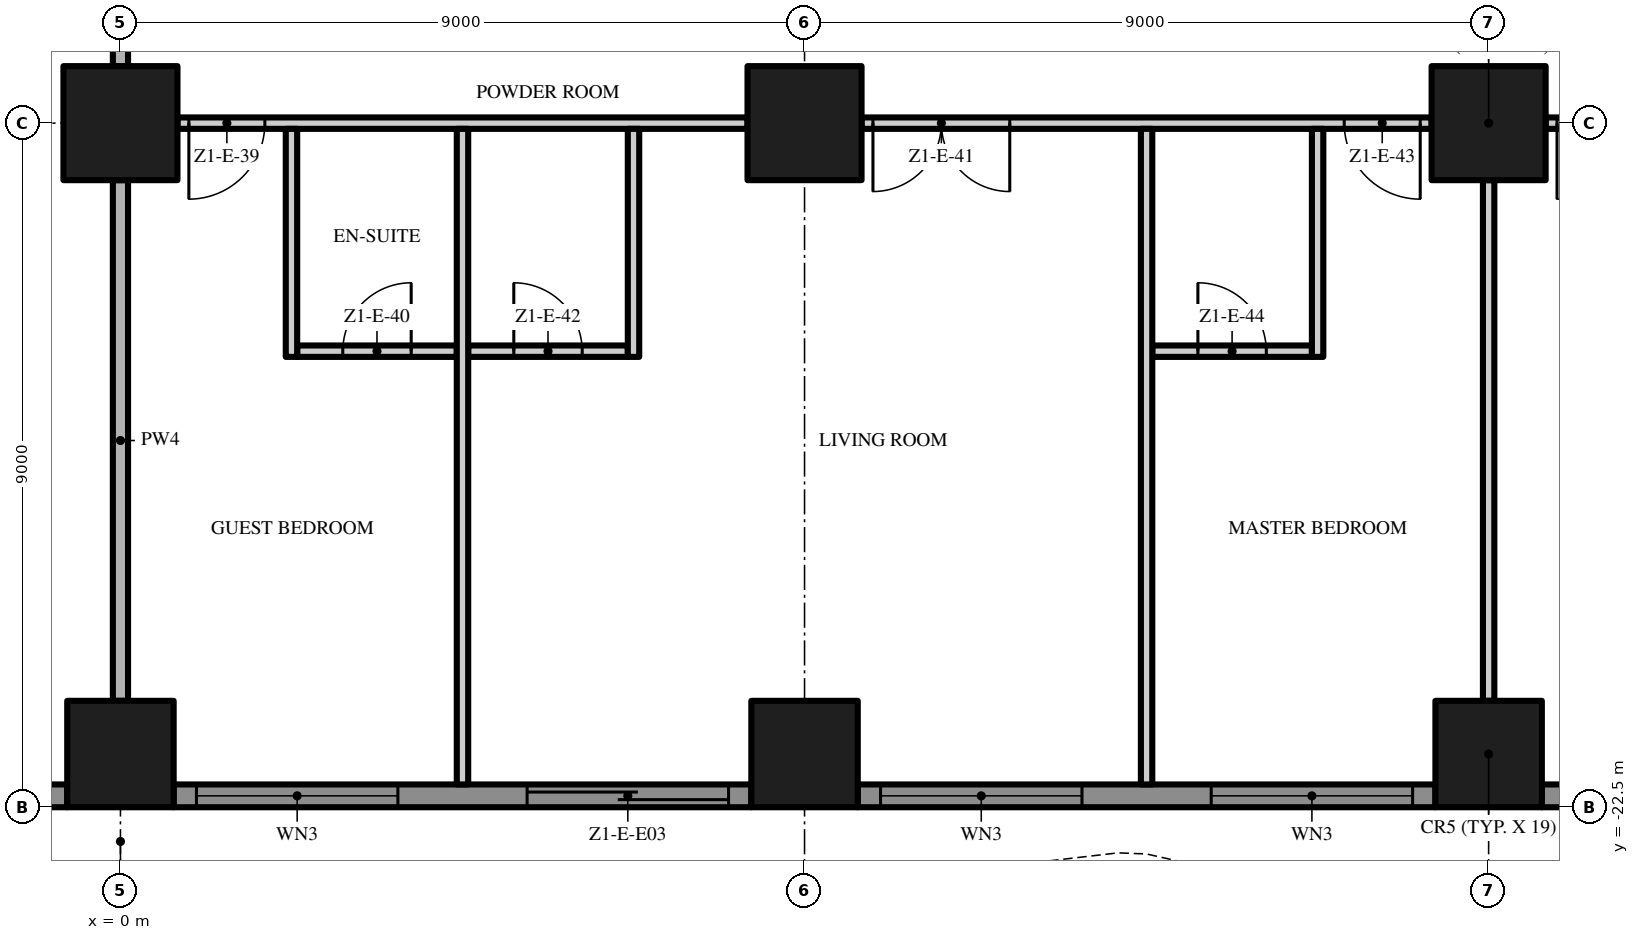
"""IFC4 building model, lengths in metres.
Left out: names, types, materials, properties, quantities, classifications, styles, units other than length and angle.
Written with IfcOpenShell. Run it as: python <this file> out.ifc"""

import sys

from ifc_helpers import new_model, si_unit, direction, frame, frame_2d, origin, origin_2d, place, context, subcontext, project, spatial, polyline, rectangle, outline, extrude, element, fill, save


model = new_model("IFC4")
c1 = context("Model", 3, precision=1e-05, world=origin(), true_north=direction((0.0, 1.0)))
c2 = subcontext(c1, "Body", "Model", "MODEL_VIEW")
j1 = project(units=[si_unit("LENGTHUNIT", "METRE"), si_unit("PLANEANGLEUNIT", "RADIAN")], contexts=[c1])
p1 = place(None, origin())
s1 = spatial("IfcSite", under=j1, at=p1, CompositionType="ELEMENT")
p2 = place(p1, origin())
s2 = spatial("IfcBuilding", under=s1, at=p2, CompositionType="ELEMENT")
p3 = place(p2, frame((0.0, 0.0, 56.8)))
s3 = spatial("IfcBuildingStorey", under=s2, at=p3, CompositionType="ELEMENT", Elevation=56.8)
p4 = place(p3, frame((0.0, -13.5, 0.0), z_axis=(0.0, 0.0, 1.0), x_axis=(1.0, 0.0, 0.0)))
e1 = element("IfcColumn", 1, at=p4, inside=s3, PredefinedType="COLUMN", context=c2, shape_type="SweptSolid", body=[
    extrude(rectangle(XDim=1.5, YDim=1.5, at=origin_2d()), origin(), (0.0, 0.0, 1.0), 3.5),
])
p5 = place(p3, frame((0.0, -21.8, 0.0), z_axis=(0.0, 0.0, 1.0), x_axis=(1.0, 0.0, 0.0)))
e2 = element("IfcColumn", 2, at=p5, inside=s3, PredefinedType="COLUMN", context=c2, shape_type="SweptSolid", body=[
    extrude(rectangle(XDim=1.4, YDim=1.4, at=origin_2d()), origin(), (0.0, 0.0, 1.0), 3.5),
])
p6 = place(p3, frame((18.0, -13.5, 0.0), z_axis=(0.0, 0.0, 1.0), x_axis=(1.0, 0.0, 0.0)))
e3 = element("IfcColumn", 3, at=p6, inside=s3, PredefinedType="COLUMN", context=c2, shape_type="SweptSolid", body=[
    extrude(rectangle(XDim=1.5, YDim=1.5, at=origin_2d()), origin(), (0.0, 0.0, 1.0), 3.5),
])
p7 = place(p3, frame((18.0, -21.8, 0.0), z_axis=(0.0, 0.0, 1.0), x_axis=(1.0, 0.0, 0.0)))
e4 = element("IfcColumn", 4, at=p7, inside=s3, PredefinedType="COLUMN", context=c2, shape_type="SweptSolid", body=[
    extrude(rectangle(XDim=1.4, YDim=1.4, at=origin_2d()), origin(), (0.0, 0.0, 1.0), 3.5),
])
p8 = place(p3, frame((9.0, -13.5, 0.0), z_axis=(0.0, 0.0, 1.0), x_axis=(1.0, 0.0, 0.0)))
e5 = element("IfcColumn", 5, at=p8, inside=s3, PredefinedType="COLUMN", context=c2, shape_type="SweptSolid", body=[
    extrude(rectangle(XDim=1.5, YDim=1.5, at=origin_2d()), origin(), (0.0, 0.0, 1.0), 3.5),
])
p9 = place(p3, frame((9.0, -21.8, 0.0), z_axis=(0.0, 0.0, 1.0), x_axis=(1.0, 0.0, 0.0)))
e6 = element("IfcColumn", 6, at=p9, inside=s3, PredefinedType="COLUMN", context=c2, shape_type="SweptSolid", body=[
    extrude(rectangle(XDim=1.4, YDim=1.4, at=origin_2d()), origin(), (0.0, 0.0, 1.0), 3.5),
])
p10 = place(p3, frame((-0.7, -22.35, 0.0), z_axis=(0.0, 0.0, 1.0), x_axis=(-1.0, 0.0, 0.0)))
e7 = element("IfcWall", 7, at=p10, inside=s3, PredefinedType="SOLIDWALL", context=c2, shape_type="SweptSolid", body=[
    extrude(rectangle(XDim=7.6, YDim=0.3, at=frame_2d((3.8, 0.0))), origin(), (0.0, 0.0, 1.0), 3.5),
])
p11 = place(p10, frame((4.65, 0.0, 0.0)))
e8 = element("IfcOpeningElement", 8, at=p11, cuts=e7, PredefinedType="OPENING", context=c2, shape_type="SweptSolid", body=[
    extrude(rectangle(XDim=2.65, YDim=2.4, at=frame_2d((1.325, 1.2))), frame((0.0, 0.16, 0.0), z_axis=(0.0, -1.0, 0.0), x_axis=(1.0, 0.0, 0.0)), (0.0, 0.0, 1.0), 0.32),
])
p12 = place(p10, frame((0.3, 0.0, 0.45)))
e9 = element("IfcOpeningElement", 9, at=p12, cuts=e7, PredefinedType="OPENING", context=c2, shape_type="SweptSolid", body=[
    extrude(rectangle(XDim=2.65, YDim=2.65, at=frame_2d((1.325, 1.325))), frame((0.0, 0.16, 0.0), z_axis=(0.0, -1.0, 0.0), x_axis=(1.0, 0.0, 0.0)), (0.0, 0.0, 1.0), 0.32),
])
p13 = place(p3, frame((8.3, -22.35, 0.0), z_axis=(0.0, 0.0, 1.0), x_axis=(-1.0, 0.0, 0.0)))
e10 = element("IfcWall", 10, at=p13, inside=s3, PredefinedType="SOLIDWALL", context=c2, shape_type="SweptSolid", body=[
    extrude(rectangle(XDim=7.6, YDim=0.3, at=frame_2d((3.8, 0.0))), origin(), (0.0, 0.0, 1.0), 3.5),
])
p14 = place(p13, frame((4.65, 0.0, 0.45)))
e11 = element("IfcOpeningElement", 11, at=p14, cuts=e10, PredefinedType="OPENING", context=c2, shape_type="SweptSolid", body=[
    extrude(rectangle(XDim=2.65, YDim=2.65, at=frame_2d((1.325, 1.325))), frame((0.0, 0.16, 0.0), z_axis=(0.0, -1.0, 0.0), x_axis=(1.0, 0.0, 0.0)), (0.0, 0.0, 1.0), 0.32),
])
p15 = place(p13, frame((0.3, 0.0, 0.0)))
e12 = element("IfcOpeningElement", 12, at=p15, cuts=e10, PredefinedType="OPENING", context=c2, shape_type="SweptSolid", body=[
    extrude(rectangle(XDim=2.65, YDim=2.4, at=frame_2d((1.325, 1.2))), frame((0.0, 0.16, 0.0), z_axis=(0.0, -1.0, 0.0), x_axis=(1.0, 0.0, 0.0)), (0.0, 0.0, 1.0), 0.32),
])
p16 = place(p3, frame((17.3, -22.35, 0.0), z_axis=(0.0, 0.0, 1.0), x_axis=(-1.0, 0.0, 0.0)))
e13 = element("IfcWall", 13, at=p16, inside=s3, PredefinedType="SOLIDWALL", context=c2, shape_type="SweptSolid", body=[
    extrude(rectangle(XDim=7.6, YDim=0.3, at=frame_2d((3.8, 0.0))), origin(), (0.0, 0.0, 1.0), 3.5),
])
p17 = place(p16, frame((4.65, 0.0, 0.45)))
e14 = element("IfcOpeningElement", 14, at=p17, cuts=e13, PredefinedType="OPENING", context=c2, shape_type="SweptSolid", body=[
    extrude(rectangle(XDim=2.65, YDim=2.65, at=frame_2d((1.325, 1.325))), frame((0.0, 0.16, 0.0), z_axis=(0.0, -1.0, 0.0), x_axis=(1.0, 0.0, 0.0)), (0.0, 0.0, 1.0), 0.32),
])
p18 = place(p16, frame((0.3, 0.0, 0.45)))
e15 = element("IfcOpeningElement", 15, at=p18, cuts=e13, PredefinedType="OPENING", context=c2, shape_type="SweptSolid", body=[
    extrude(rectangle(XDim=2.65, YDim=2.65, at=frame_2d((1.325, 1.325))), frame((0.0, 0.16, 0.0), z_axis=(0.0, -1.0, 0.0), x_axis=(1.0, 0.0, 0.0)), (0.0, 0.0, 1.0), 0.32),
])
p19 = place(p3, frame((22.5, -22.35, 0.0), z_axis=(0.0, 0.0, 1.0), x_axis=(-1.0, 0.0, 0.0)))
e16 = element("IfcWall", 16, at=p19, inside=s3, PredefinedType="SOLIDWALL", context=c2, shape_type="SweptSolid", body=[
    extrude(rectangle(XDim=3.8, YDim=0.3, at=frame_2d((1.9, 0.0))), origin(), (0.0, 0.0, 1.0), 3.5),
])
p20 = place(p19, frame((0.85, 0.0, 0.0)))
e17 = element("IfcOpeningElement", 17, at=p20, cuts=e16, PredefinedType="OPENING", context=c2, shape_type="SweptSolid", body=[
    extrude(rectangle(XDim=2.65, YDim=2.4, at=frame_2d((1.325, 1.2))), frame((0.0, 0.16, 0.0), z_axis=(0.0, -1.0, 0.0), x_axis=(1.0, 0.0, 0.0)), (0.0, 0.0, 1.0), 0.32),
])
p21 = place(p3, origin())
e18 = element("IfcWall", 18, at=p21, inside=s3, PredefinedType="USERDEFINED", context=c2, shape_type="SweptSolid", body=[
    extrude(outline(polyline([(-22.5, -25.149), (-21.0, -24.488), (-19.5, -23.755), (-18.0, -23.231), (-16.875, -23.1), (-16.5, -23.115), (-15.0, -23.451), (-13.5, -24.112), (-12.0, -24.845), (-10.5, -25.369), (-9.375, -25.5), (-9.0, -25.485), (-7.5, -25.149), (-6.0, -24.488), (-4.5, -23.755), (-3.0, -23.231), (-1.875, -23.1), (-1.5, -23.115), (0.0, -23.451), (1.5, -24.112), (3.0, -24.845), (4.5, -25.369), (5.625, -25.5), (6.0, -25.485), (7.5, -25.149), (9.0, -24.488), (10.5, -23.755), (12.0, -23.231), (13.125, -23.1), (13.5, -23.115), (15.0, -23.451), (16.5, -24.112), (18.0, -24.845), (19.5, -25.369), (20.625, -25.5), (21.0, -25.485), (22.5, -25.149), (22.445, -24.905), (20.967, -25.236), (20.635, -25.249), (19.556, -25.124), (18.096, -24.614), (16.605, -23.885), (15.079, -23.213), (13.533, -22.866), (13.115, -22.849), (11.944, -22.986), (10.404, -23.524), (8.895, -24.261), (7.421, -24.91), (5.967, -25.236), (5.635, -25.249), (4.556, -25.124), (3.096, -24.614), (1.605, -23.885), (0.079, -23.213), (-1.467, -22.866), (-1.885, -22.849), (-3.056, -22.986), (-4.596, -23.524), (-6.105, -24.261), (-7.579, -24.91), (-9.033, -25.236), (-9.365, -25.249), (-10.444, -25.124), (-11.904, -24.614), (-13.395, -23.885), (-14.921, -23.213), (-16.467, -22.866), (-16.885, -22.849), (-18.056, -22.986), (-19.596, -23.524), (-21.105, -24.261), (-22.601, -24.92), (-22.5, -25.149)])), origin(), (0.0, 0.0, 1.0), 0.9),
])
p22 = place(p3, frame((2.325, -16.5, 0.0), z_axis=(0.0, 0.0, 1.0), x_axis=(1.0, 0.0, 0.0)))
e19 = element("IfcWall", 19, at=p22, inside=s3, PredefinedType="PARTITIONING", context=c2, shape_type="SweptSolid", body=[
    extrude(rectangle(XDim=2.1, YDim=0.15, at=frame_2d((1.05, 0.0))), origin(), (0.0, 0.0, 1.0), 3.5),
])
p23 = place(p22, frame((0.6, 0.0, 0.0)))
e20 = element("IfcOpeningElement", 20, at=p23, cuts=e19, PredefinedType="OPENING", context=c2, shape_type="SweptSolid", body=[
    extrude(rectangle(XDim=0.9, YDim=2.1, at=frame_2d((0.45, 1.05))), frame((0.0, 0.085, 0.0), z_axis=(0.0, -1.0, 0.0), x_axis=(1.0, 0.0, 0.0)), (0.0, 0.0, 1.0), 0.17),
])
p24 = place(p3, frame((4.575, -16.5, 0.0), z_axis=(0.0, 0.0, 1.0), x_axis=(1.0, 0.0, 0.0)))
e21 = element("IfcWall", 21, at=p24, inside=s3, PredefinedType="PARTITIONING", context=c2, shape_type="SweptSolid", body=[
    extrude(rectangle(XDim=2.1, YDim=0.15, at=frame_2d((1.05, 0.0))), origin(), (0.0, 0.0, 1.0), 3.5),
])
p25 = place(p24, frame((0.6, 0.0, 0.0)))
e22 = element("IfcOpeningElement", 22, at=p25, cuts=e21, PredefinedType="OPENING", context=c2, shape_type="SweptSolid", body=[
    extrude(rectangle(XDim=0.9, YDim=2.1, at=frame_2d((0.45, 1.05))), frame((0.0, 0.085, 0.0), z_axis=(0.0, -1.0, 0.0), x_axis=(1.0, 0.0, 0.0)), (0.0, 0.0, 1.0), 0.17),
])
p26 = place(p3, frame((13.575, -16.5, 0.0), z_axis=(0.0, 0.0, 1.0), x_axis=(1.0, 0.0, 0.0)))
e23 = element("IfcWall", 23, at=p26, inside=s3, PredefinedType="PARTITIONING", context=c2, shape_type="SweptSolid", body=[
    extrude(rectangle(XDim=2.1, YDim=0.15, at=frame_2d((1.05, 0.0))), origin(), (0.0, 0.0, 1.0), 3.5),
])
p27 = place(p26, frame((0.6, 0.0, 0.0)))
e24 = element("IfcOpeningElement", 24, at=p27, cuts=e23, PredefinedType="OPENING", context=c2, shape_type="SweptSolid", body=[
    extrude(rectangle(XDim=0.9, YDim=2.1, at=frame_2d((0.45, 1.05))), frame((0.0, 0.085, 0.0), z_axis=(0.0, -1.0, 0.0), x_axis=(1.0, 0.0, 0.0)), (0.0, 0.0, 1.0), 0.17),
])
p28 = place(p3, frame((8.25, -13.5, 0.0), z_axis=(0.0, 0.0, 1.0), x_axis=(-1.0, 0.0, 0.0)))
e25 = element("IfcWall", 25, at=p28, inside=s3, PredefinedType="PARTITIONING", context=c2, shape_type="SweptSolid", body=[
    extrude(rectangle(XDim=7.5, YDim=0.15, at=frame_2d((3.75, 0.0))), origin(), (0.0, 0.0, 1.0), 3.5),
])
p29 = place(p28, frame((6.35, 0.0, 0.0)))
e26 = element("IfcOpeningElement", 26, at=p29, cuts=e25, PredefinedType="OPENING", context=c2, shape_type="SweptSolid", body=[
    extrude(rectangle(XDim=1.0, YDim=2.4, at=frame_2d((0.5, 1.2))), frame((0.0, 0.085, 0.0), z_axis=(0.0, -1.0, 0.0), x_axis=(1.0, 0.0, 0.0)), (0.0, 0.0, 1.0), 0.17),
])
p30 = place(p3, frame((17.25, -13.5, 0.0), z_axis=(0.0, 0.0, 1.0), x_axis=(-1.0, 0.0, 0.0)))
e27 = element("IfcWall", 27, at=p30, inside=s3, PredefinedType="PARTITIONING", context=c2, shape_type="SweptSolid", body=[
    extrude(rectangle(XDim=7.5, YDim=0.15, at=frame_2d((3.75, 0.0))), origin(), (0.0, 0.0, 1.0), 3.5),
])
p31 = place(p30, frame((5.55, 0.0, 0.0)))
e28 = element("IfcOpeningElement", 28, at=p31, cuts=e27, PredefinedType="OPENING", context=c2, shape_type="SweptSolid", body=[
    extrude(rectangle(XDim=1.8, YDim=2.4, at=frame_2d((0.9, 1.2))), frame((0.0, 0.085, 0.0), z_axis=(0.0, -1.0, 0.0), x_axis=(1.0, 0.0, 0.0)), (0.0, 0.0, 1.0), 0.17),
])
p32 = place(p30, frame((0.15, 0.0, 0.0)))
e29 = element("IfcOpeningElement", 29, at=p32, cuts=e27, PredefinedType="OPENING", context=c2, shape_type="SweptSolid", body=[
    extrude(rectangle(XDim=1.0, YDim=2.4, at=frame_2d((0.5, 1.2))), frame((0.0, 0.085, 0.0), z_axis=(0.0, -1.0, 0.0), x_axis=(1.0, 0.0, 0.0)), (0.0, 0.0, 1.0), 0.17),
])
p33 = place(p3, frame((25.6, -13.5, 0.0), z_axis=(0.0, 0.0, 1.0), x_axis=(-1.0, 0.0, 0.0)))
e30 = element("IfcWall", 30, at=p33, inside=s3, PredefinedType="PARTITIONING", context=c2, shape_type="SweptSolid", body=[
    extrude(rectangle(XDim=6.85, YDim=0.15, at=frame_2d((3.425, 0.0))), origin(), (0.0, 0.0, 1.0), 3.5),
])
p34 = place(p33, frame((5.7, 0.0, 0.0)))
e31 = element("IfcOpeningElement", 31, at=p34, cuts=e30, PredefinedType="OPENING", context=c2, shape_type="SweptSolid", body=[
    extrude(rectangle(XDim=1.0, YDim=2.4, at=frame_2d((0.5, 1.2))), frame((0.0, 0.085, 0.0), z_axis=(0.0, -1.0, 0.0), x_axis=(1.0, 0.0, 0.0)), (0.0, 0.0, 1.0), 0.17),
])
p35 = place(p33, frame((0.35, 0.0, 0.0)))
e32 = element("IfcOpeningElement", 32, at=p35, cuts=e30, PredefinedType="OPENING", context=c2, shape_type="SweptSolid", body=[
    extrude(rectangle(XDim=1.0, YDim=2.4, at=frame_2d((0.5, 1.2))), frame((0.0, 0.085, 0.0), z_axis=(0.0, -1.0, 0.0), x_axis=(1.0, 0.0, 0.0)), (0.0, 0.0, 1.0), 0.17),
])
p36 = place(p3, frame((0.0, -21.1, 0.0), z_axis=(0.0, 0.0, 1.0), x_axis=(0.0, 1.0, 0.0)))
e33 = element("IfcWall", 33, at=p36, inside=s3, PredefinedType="PARTITIONING", context=c2, shape_type="SweptSolid", body=[
    extrude(rectangle(XDim=6.85, YDim=0.2, at=frame_2d((3.425, 0.0))), origin(), (0.0, 0.0, 1.0), 3.5),
])
p37 = place(p3, frame((0.0, -12.75, 0.0), z_axis=(0.0, 0.0, 1.0), x_axis=(0.0, 1.0, 0.0)))
e34 = element("IfcWall", 34, at=p37, inside=s3, PredefinedType="PARTITIONING", context=c2, shape_type="SweptSolid", body=[
    extrude(rectangle(XDim=7.5, YDim=0.2, at=frame_2d((3.75, 0.0))), origin(), (0.0, 0.0, 1.0), 3.5),
])
p38 = place(p3, frame((2.25, -16.575, 0.0), z_axis=(0.0, 0.0, 1.0), x_axis=(0.0, 1.0, 0.0)))
e35 = element("IfcWall", 35, at=p38, inside=s3, PredefinedType="PARTITIONING", context=c2, shape_type="SweptSolid", body=[
    extrude(rectangle(XDim=3.0, YDim=0.15, at=frame_2d((1.5, 0.0))), origin(), (0.0, 0.0, 1.0), 3.5),
])
p39 = place(p3, frame((4.5, -22.2, 0.0), z_axis=(0.0, 0.0, 1.0), x_axis=(0.0, 1.0, 0.0)))
e36 = element("IfcWall", 36, at=p39, inside=s3, PredefinedType="PARTITIONING", context=c2, shape_type="SweptSolid", body=[
    extrude(rectangle(XDim=8.625, YDim=0.15, at=frame_2d((4.312, 0.0))), origin(), (0.0, 0.0, 1.0), 3.5),
])
p40 = place(p3, frame((6.75, -16.575, 0.0), z_axis=(0.0, 0.0, 1.0), x_axis=(0.0, 1.0, 0.0)))
e37 = element("IfcWall", 37, at=p40, inside=s3, PredefinedType="PARTITIONING", context=c2, shape_type="SweptSolid", body=[
    extrude(rectangle(XDim=3.0, YDim=0.15, at=frame_2d((1.5, 0.0))), origin(), (0.0, 0.0, 1.0), 3.5),
])
p41 = place(p3, frame((13.5, -22.2, 0.0), z_axis=(0.0, 0.0, 1.0), x_axis=(0.0, 1.0, 0.0)))
e38 = element("IfcWall", 38, at=p41, inside=s3, PredefinedType="PARTITIONING", context=c2, shape_type="SweptSolid", body=[
    extrude(rectangle(XDim=8.625, YDim=0.15, at=frame_2d((4.312, 0.0))), origin(), (0.0, 0.0, 1.0), 3.5),
])
p42 = place(p3, frame((15.75, -16.575, 0.0), z_axis=(0.0, 0.0, 1.0), x_axis=(0.0, 1.0, 0.0)))
e39 = element("IfcWall", 39, at=p42, inside=s3, PredefinedType="PARTITIONING", context=c2, shape_type="SweptSolid", body=[
    extrude(rectangle(XDim=3.0, YDim=0.15, at=frame_2d((1.5, 0.0))), origin(), (0.0, 0.0, 1.0), 3.5),
])
p43 = place(p3, frame((18.0, -21.1, 0.0), z_axis=(0.0, 0.0, 1.0), x_axis=(0.0, 1.0, 0.0)))
e40 = element("IfcWall", 40, at=p43, inside=s3, PredefinedType="PARTITIONING", context=c2, shape_type="SweptSolid", body=[
    extrude(rectangle(XDim=6.85, YDim=0.15, at=frame_2d((3.425, 0.0))), origin(), (0.0, 0.0, 1.0), 3.5),
])
p44 = place(p14, origin())
e41 = element("IfcWindow", 41, at=p44, inside=s3, PartitioningType="SINGLE_PANEL", PredefinedType="WINDOW", context=c2, shape_type="SweptSolid", body=[
    extrude(rectangle(XDim=2.65, YDim=2.65, at=frame_2d((1.325, 1.325))), frame((0.0, 0.03, 0.0), z_axis=(0.0, -1.0, 0.0), x_axis=(1.0, 0.0, 0.0)), (0.0, 0.0, 1.0), 0.06),
])
fill(e11, e41)
p45 = place(p15, origin())
e42 = element("IfcDoor", 42, at=p45, inside=s3, OperationType="SINGLE_SWING_LEFT", PredefinedType="DOOR", context=c2, shape_type="SweptSolid", body=[
    extrude(rectangle(XDim=2.65, YDim=2.4, at=frame_2d((1.325, 1.2))), frame((0.0, 0.025, 0.0), z_axis=(0.0, -1.0, 0.0), x_axis=(1.0, 0.0, 0.0)), (0.0, 0.0, 1.0), 0.05),
])
fill(e12, e42)
p46 = place(p17, origin())
e43 = element("IfcWindow", 43, at=p46, inside=s3, PartitioningType="SINGLE_PANEL", PredefinedType="WINDOW", context=c2, shape_type="SweptSolid", body=[
    extrude(rectangle(XDim=2.65, YDim=2.65, at=frame_2d((1.325, 1.325))), frame((0.0, 0.03, 0.0), z_axis=(0.0, -1.0, 0.0), x_axis=(1.0, 0.0, 0.0)), (0.0, 0.0, 1.0), 0.06),
])
fill(e14, e43)
p47 = place(p18, origin())
e44 = element("IfcWindow", 44, at=p47, inside=s3, PartitioningType="SINGLE_PANEL", PredefinedType="WINDOW", context=c2, shape_type="SweptSolid", body=[
    extrude(rectangle(XDim=2.65, YDim=2.65, at=frame_2d((1.325, 1.325))), frame((0.0, 0.03, 0.0), z_axis=(0.0, -1.0, 0.0), x_axis=(1.0, 0.0, 0.0)), (0.0, 0.0, 1.0), 0.06),
])
fill(e15, e44)
p48 = place(p29, origin())
e45 = element("IfcDoor", 45, at=p48, inside=s3, OperationType="SINGLE_SWING_RIGHT", PredefinedType="DOOR", context=c2, shape_type="SweptSolid", body=[
    extrude(rectangle(XDim=1.0, YDim=2.4, at=frame_2d((0.5, 1.2))), frame((0.0, 0.025, 0.0), z_axis=(0.0, -1.0, 0.0), x_axis=(1.0, 0.0, 0.0)), (0.0, 0.0, 1.0), 0.05),
])
fill(e26, e45)
p49 = place(p23, origin())
e46 = element("IfcDoor", 46, at=p49, inside=s3, OperationType="SINGLE_SWING_RIGHT", PredefinedType="DOOR", context=c2, shape_type="SweptSolid", body=[
    extrude(rectangle(XDim=0.9, YDim=2.1, at=frame_2d((0.45, 1.05))), frame((0.0, 0.025, 0.0), z_axis=(0.0, -1.0, 0.0), x_axis=(1.0, 0.0, 0.0)), (0.0, 0.0, 1.0), 0.05),
])
fill(e20, e46)
p50 = place(p31, origin())
e47 = element("IfcDoor", 47, at=p50, inside=s3, OperationType="DOUBLE_DOOR_SINGLE_SWING", PredefinedType="DOOR", context=c2, shape_type="SweptSolid", body=[
    extrude(rectangle(XDim=1.8, YDim=2.4, at=frame_2d((0.9, 1.2))), frame((0.0, 0.025, 0.0), z_axis=(0.0, -1.0, 0.0), x_axis=(1.0, 0.0, 0.0)), (0.0, 0.0, 1.0), 0.05),
])
fill(e28, e47)
p51 = place(p25, origin())
e48 = element("IfcDoor", 48, at=p51, inside=s3, OperationType="SINGLE_SWING_LEFT", PredefinedType="DOOR", context=c2, shape_type="SweptSolid", body=[
    extrude(rectangle(XDim=0.9, YDim=2.1, at=frame_2d((0.45, 1.05))), frame((0.0, 0.025, 0.0), z_axis=(0.0, -1.0, 0.0), x_axis=(1.0, 0.0, 0.0)), (0.0, 0.0, 1.0), 0.05),
])
fill(e22, e48)
p52 = place(p32, origin())
e49 = element("IfcDoor", 49, at=p52, inside=s3, OperationType="SINGLE_SWING_LEFT", PredefinedType="DOOR", context=c2, shape_type="SweptSolid", body=[
    extrude(rectangle(XDim=1.0, YDim=2.4, at=frame_2d((0.5, 1.2))), frame((0.0, 0.025, 0.0), z_axis=(0.0, -1.0, 0.0), x_axis=(1.0, 0.0, 0.0)), (0.0, 0.0, 1.0), 0.05),
])
fill(e29, e49)
p53 = place(p27, origin())
e50 = element("IfcDoor", 50, at=p53, inside=s3, OperationType="SINGLE_SWING_LEFT", PredefinedType="DOOR", context=c2, shape_type="SweptSolid", body=[
    extrude(rectangle(XDim=0.9, YDim=2.1, at=frame_2d((0.45, 1.05))), frame((0.0, 0.025, 0.0), z_axis=(0.0, -1.0, 0.0), x_axis=(1.0, 0.0, 0.0)), (0.0, 0.0, 1.0), 0.05),
])
fill(e24, e50)
p54 = place(p34, origin())
e51 = element("IfcDoor", 51, at=p54, inside=s3, OperationType="SINGLE_SWING_RIGHT", PredefinedType="DOOR", context=c2, shape_type="SweptSolid", body=[
    extrude(rectangle(XDim=1.0, YDim=2.4, at=frame_2d((0.5, 1.2))), frame((0.0, 0.025, 0.0), z_axis=(0.0, -1.0, 0.0), x_axis=(1.0, 0.0, 0.0)), (0.0, 0.0, 1.0), 0.05),
])
fill(e31, e51)
save(model, sys.argv[1])
